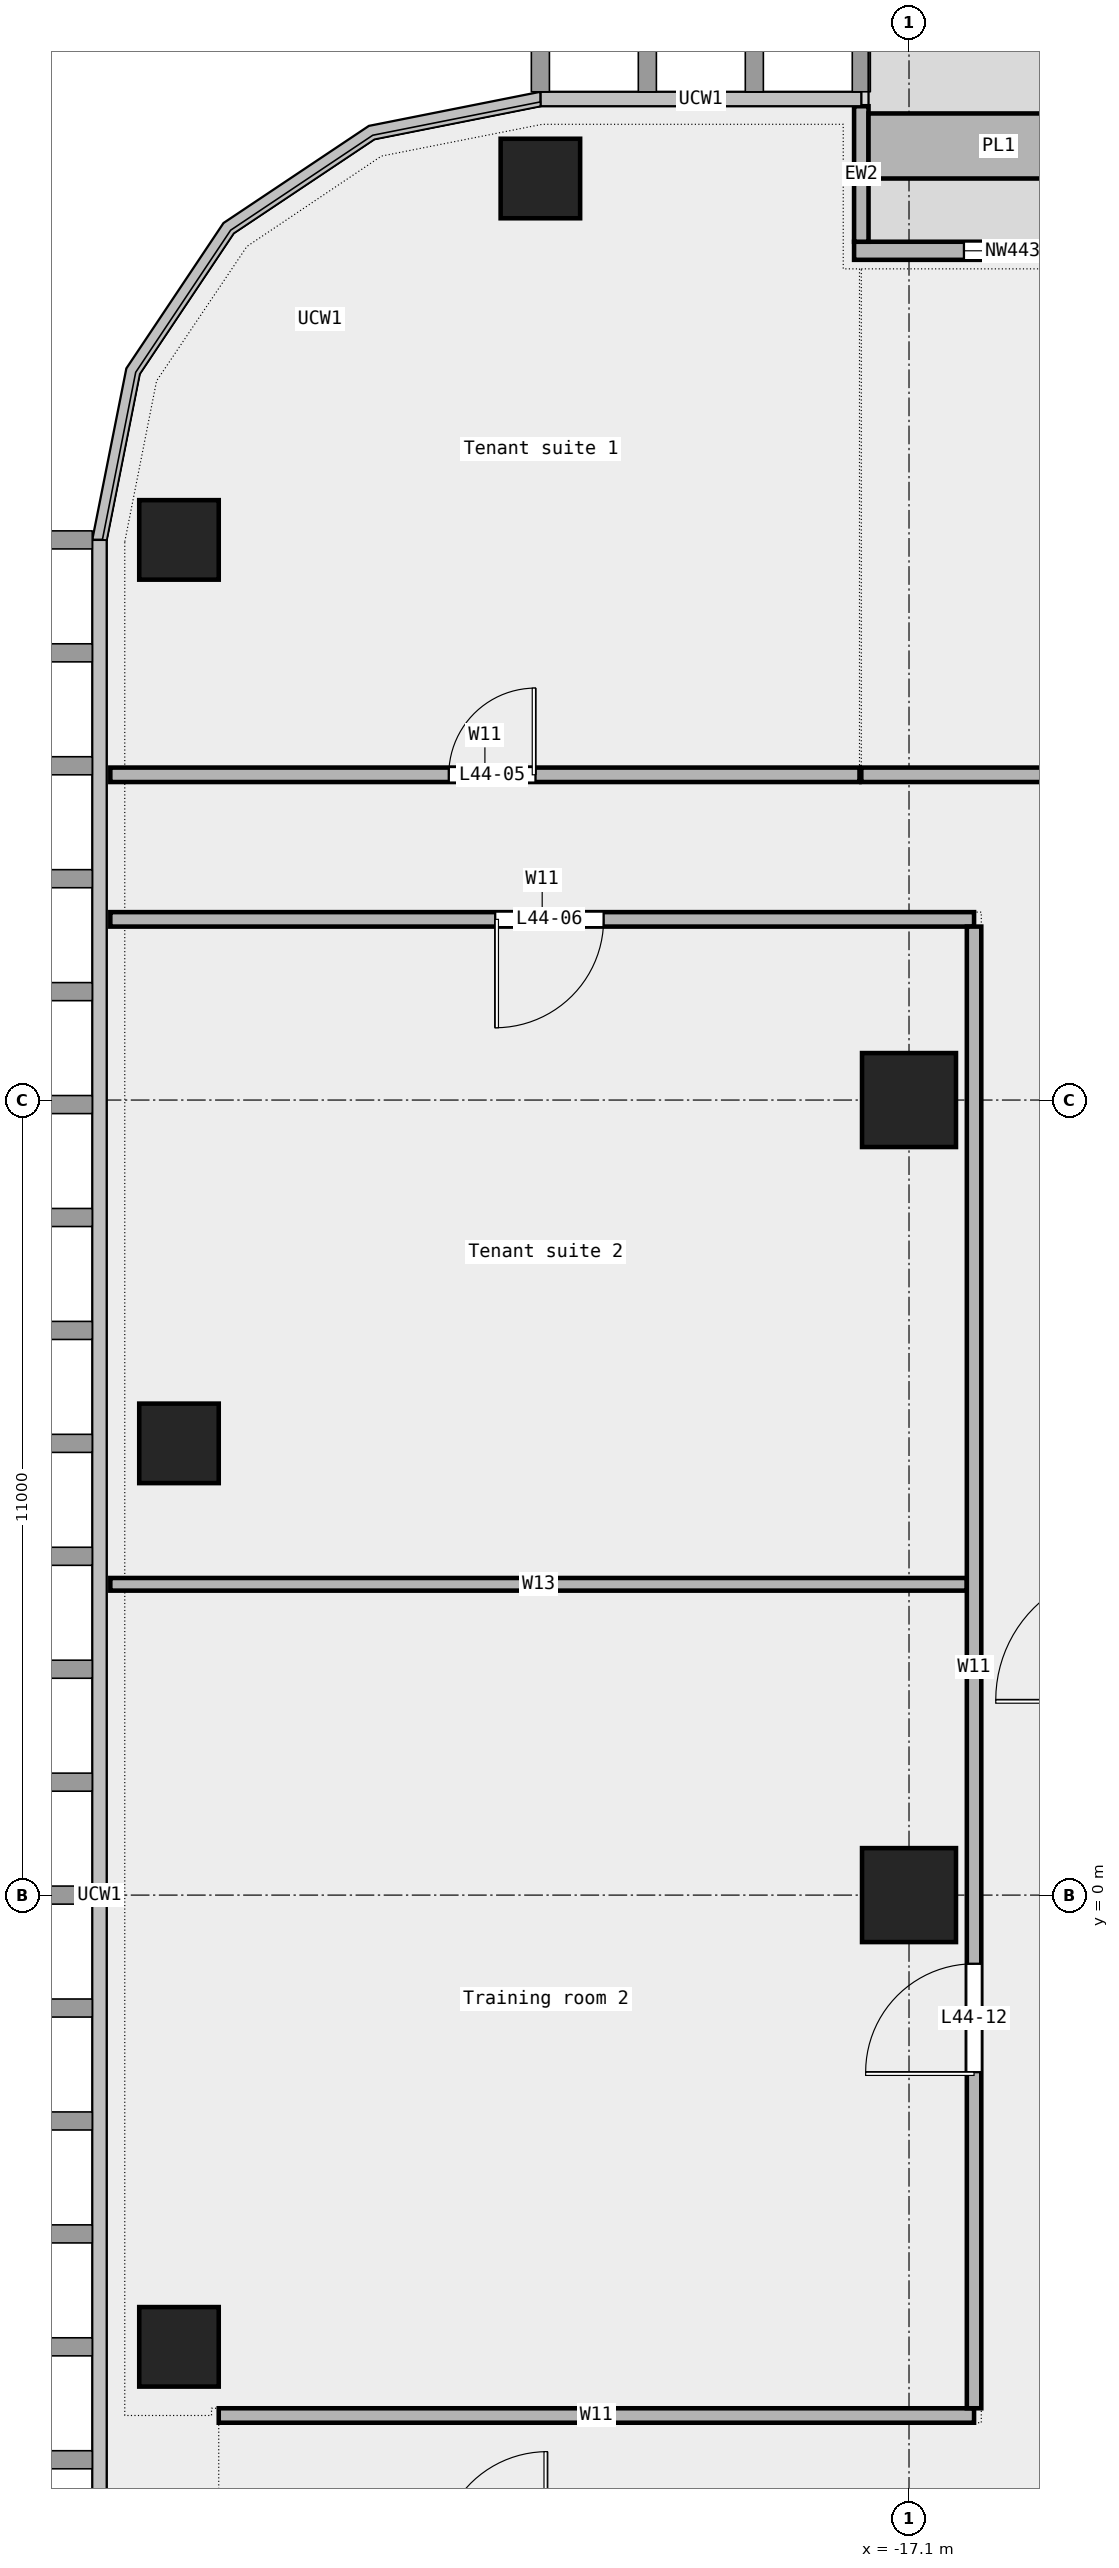
"""IFC4 building model, lengths in metres.
Left out: names, types, materials, properties, quantities, classifications, styles, units other than length and angle.
Written with IfcOpenShell. Run it as: python <this file> out.ifc"""

import sys

from ifc_helpers import new_model, si_unit, direction, frame, frame_2d, origin, origin_2d, place, context, subcontext, project, spatial, rectangle, extrude, element, fill, save


model = new_model("IFC4")
c1 = context("Model", 3, precision=1e-05, world=origin(), true_north=direction((0.0, 1.0)))
c2 = subcontext(c1, "Body", "Model", "MODEL_VIEW")
j1 = project(units=[si_unit("LENGTHUNIT", "METRE"), si_unit("PLANEANGLEUNIT", "RADIAN")], contexts=[c1])
p1 = place(None, origin())
s1 = spatial("IfcSite", under=j1, at=p1, CompositionType="ELEMENT")
p2 = place(p1, origin())
s2 = spatial("IfcBuilding", under=s1, at=p2, CompositionType="ELEMENT")
p3 = place(p2, frame((0.0, 0.0, 211.0)))
s3 = spatial("IfcBuildingStorey", under=s2, at=p3, CompositionType="ELEMENT", Elevation=211.0)
for number, where, z_axis, x_axis in (
    (1, (-22.2, 23.75, 0.0), (0.0, 0.0, 1.0), (1.0, 0.0, 0.0)),
    (2, (-27.2, 18.75, 0.0), (0.0, 0.0, 1.0), (1.0, 0.0, 0.0)),
    (3, (-27.2, 6.25, 0.0), (0.0, 0.0, 1.0), (1.0, 0.0, 0.0)),
    (4, (-27.2, -6.25, 0.0), (0.0, 0.0, 1.0), (1.0, 0.0, 0.0)),
):
    element("IfcColumn", number, at=place(p3, frame(where, z_axis=z_axis, x_axis=x_axis)), inside=s3, PredefinedType="COLUMN", context=c2, shape_type="SweptSolid", body=[
        extrude(rectangle(XDim=1.1, YDim=1.1, at=origin_2d()), origin(), (0.0, 0.0, 1.0), 3.6),
    ])
for number, where, z_axis, x_axis in (
    (5, (-17.1, 0.0, 0.0), (0.0, 0.0, 1.0), (1.0, 0.0, 0.0)),
    (6, (-17.1, 11.0, 0.0), (0.0, 0.0, 1.0), (1.0, 0.0, 0.0)),
):
    element("IfcColumn", number, at=place(p3, frame(where, z_axis=z_axis, x_axis=x_axis)), inside=s3, PredefinedType="COLUMN", context=c2, shape_type="SweptSolid", body=[
        extrude(rectangle(XDim=1.3, YDim=1.3, at=origin_2d()), origin(), (0.0, 0.0, 1.0), 3.6),
    ])
p4 = place(p3, frame((-4.34, 22.75, 0.0), z_axis=(0.0, 0.0, 1.0), x_axis=(-1.0, 0.0, 0.0)))
e7 = element("IfcWall", 7, at=p4, inside=s3, PredefinedType="STANDARD", context=c2, shape_type="SweptSolid", body=[
    extrude(rectangle(XDim=13.52, YDim=0.25, at=frame_2d((6.76, 0.0))), origin(), (0.0, 0.0, 1.0), 3.6),
])
p5 = place(p4, frame((1.5, 0.0, 0.45)))
e8 = element("IfcOpeningElement", 8, at=p5, cuts=e7, PredefinedType="OPENING", context=c2, shape_type="SweptSolid", body=[
    extrude(rectangle(XDim=1.5, YDim=2.4, at=frame_2d((0.75, 1.2))), frame((0.0, 0.137, 0.0), z_axis=(0.0, -1.0, 0.0), x_axis=(1.0, 0.0, 0.0)), (0.0, 0.0, 1.0), 0.274),
])
p6 = place(p4, frame((4.0, 0.0, 0.0)))
e9 = element("IfcOpeningElement", 9, at=p6, cuts=e7, PredefinedType="OPENING", context=c2, shape_type="SweptSolid", body=[
    extrude(rectangle(XDim=1.8, YDim=2.4, at=frame_2d((0.9, 1.2))), frame((0.0, 0.137, 0.0), z_axis=(0.0, -1.0, 0.0), x_axis=(1.0, 0.0, 0.0)), (0.0, 0.0, 1.0), 0.274),
])
p7 = place(p4, frame((10.5, 0.0, 0.45)))
e10 = element("IfcOpeningElement", 10, at=p7, cuts=e7, PredefinedType="OPENING", context=c2, shape_type="SweptSolid", body=[
    extrude(rectangle(XDim=1.5, YDim=2.4, at=frame_2d((0.75, 1.2))), frame((0.0, 0.137, 0.0), z_axis=(0.0, -1.0, 0.0), x_axis=(1.0, 0.0, 0.0)), (0.0, 0.0, 1.0), 0.274),
])
p8 = place(p3, frame((-17.76, 24.75, 0.0), z_axis=(0.0, 0.0, 1.0), x_axis=(0.0, -1.0, 0.0)))
e11 = element("IfcWall", 11, at=p8, inside=s3, PredefinedType="STANDARD", context=c2, shape_type="SweptSolid", body=[
    extrude(rectangle(XDim=1.875, YDim=0.2, at=frame_2d((0.938, 0.0))), origin(), (0.0, 0.0, 1.0), 3.6),
])
p9 = place(p3, frame((-14.06, 24.2, 0.0), z_axis=(0.0, 0.0, 1.0), x_axis=(-1.0, 0.0, 0.0)))
e12 = element("IfcWall", 12, at=p9, inside=s3, PredefinedType="STANDARD", context=c2, shape_type="SweptSolid", body=[
    extrude(rectangle(XDim=3.6, YDim=0.9, at=frame_2d((1.8, 0.0))), origin(), (0.0, 0.0, 1.0), 0.7),
])
p10 = place(p3, frame((-26.65, -7.2, 0.0), z_axis=(0.0, 0.0, 1.0), x_axis=(1.0, 0.0, 0.0)))
e13 = element("IfcWall", 13, at=p10, inside=s3, PredefinedType="PARTITIONING", context=c2, shape_type="SweptSolid", body=[
    extrude(rectangle(XDim=10.45, YDim=0.2, at=frame_2d((5.225, 0.0))), origin(), (0.0, 0.0, 1.0), 3.6),
])
p11 = place(p3, frame((-28.15, 4.3, 0.0), z_axis=(0.0, 0.0, 1.0), x_axis=(1.0, 0.0, 0.0)))
e14 = element("IfcWall", 14, at=p11, inside=s3, PredefinedType="PARTITIONING", context=c2, shape_type="SweptSolid", body=[
    extrude(rectangle(XDim=11.85, YDim=0.175, at=frame_2d((5.925, 0.0))), origin(), (0.0, 0.0, 1.0), 3.6),
])
p12 = place(p3, frame((-28.15, 13.5, 0.0), z_axis=(0.0, 0.0, 1.0), x_axis=(1.0, 0.0, 0.0)))
e15 = element("IfcWall", 15, at=p12, inside=s3, PredefinedType="PARTITIONING", context=c2, shape_type="SweptSolid", body=[
    extrude(rectangle(XDim=11.95, YDim=0.2, at=frame_2d((5.975, 0.0))), origin(), (0.0, 0.0, 1.0), 3.6),
])
p13 = place(p12, frame((5.325, 0.0, 0.0)))
e16 = element("IfcOpeningElement", 16, at=p13, cuts=e15, PredefinedType="OPENING", context=c2, shape_type="SweptSolid", body=[
    extrude(rectangle(XDim=1.5, YDim=2.1, at=frame_2d((0.75, 1.05))), frame((0.0, 0.112, 0.0), z_axis=(0.0, -1.0, 0.0), x_axis=(1.0, 0.0, 0.0)), (0.0, 0.0, 1.0), 0.224),
])
p14 = place(p3, frame((-28.15, 15.5, 0.0), z_axis=(0.0, 0.0, 1.0), x_axis=(1.0, 0.0, 0.0)))
e17 = element("IfcWall", 17, at=p14, inside=s3, PredefinedType="PARTITIONING", context=c2, shape_type="SweptSolid", body=[
    extrude(rectangle(XDim=10.365, YDim=0.2, at=frame_2d((5.183, 0.0))), origin(), (0.0, 0.0, 1.0), 3.6),
])
p15 = place(p14, frame((4.683, 0.0, 0.0)))
e18 = element("IfcOpeningElement", 18, at=p15, cuts=e17, PredefinedType="OPENING", context=c2, shape_type="SweptSolid", body=[
    extrude(rectangle(XDim=1.2, YDim=2.1, at=frame_2d((0.6, 1.05))), frame((0.0, 0.112, 0.0), z_axis=(0.0, -1.0, 0.0), x_axis=(1.0, 0.0, 0.0)), (0.0, 0.0, 1.0), 0.224),
])
p16 = place(p3, frame((-17.76, 15.5, 0.0), z_axis=(0.0, 0.0, 1.0), x_axis=(1.0, 0.0, 0.0)))
e19 = element("IfcWall", 19, at=p16, inside=s3, PredefinedType="PARTITIONING", context=c2, shape_type="SweptSolid", body=[
    extrude(rectangle(XDim=45.91, YDim=0.2, at=frame_2d((22.955, 0.0))), origin(), (0.0, 0.0, 1.0), 3.6),
])
p17 = place(p16, frame((37.337, 0.0, 0.0)))
e20 = element("IfcOpeningElement", 20, at=p17, cuts=e19, PredefinedType="OPENING", context=c2, shape_type="SweptSolid", body=[
    extrude(rectangle(XDim=1.5, YDim=2.1, at=frame_2d((0.75, 1.05))), frame((0.0, 0.112, 0.0), z_axis=(0.0, -1.0, 0.0), x_axis=(1.0, 0.0, 0.0)), (0.0, 0.0, 1.0), 0.224),
])
p18 = place(p16, frame((24.633, 0.0, 0.0)))
e21 = element("IfcOpeningElement", 21, at=p18, cuts=e19, PredefinedType="OPENING", context=c2, shape_type="SweptSolid", body=[
    extrude(rectangle(XDim=1.5, YDim=2.1, at=frame_2d((0.75, 1.05))), frame((0.0, 0.112, 0.0), z_axis=(0.0, -1.0, 0.0), x_axis=(1.0, 0.0, 0.0)), (0.0, 0.0, 1.0), 0.224),
])
p19 = place(p16, frame((5.91, 0.0, 0.0)))
e22 = element("IfcOpeningElement", 22, at=p19, cuts=e19, PredefinedType="OPENING", context=c2, shape_type="SweptSolid", body=[
    extrude(rectangle(XDim=1.5, YDim=2.1, at=frame_2d((0.75, 1.05))), frame((0.0, 0.112, 0.0), z_axis=(0.0, -1.0, 0.0), x_axis=(1.0, 0.0, 0.0)), (0.0, 0.0, 1.0), 0.224),
])
p20 = place(p16, frame((16.21, 0.0, 0.0)))
e23 = element("IfcOpeningElement", 23, at=p20, cuts=e19, PredefinedType="OPENING", context=c2, shape_type="SweptSolid", body=[
    extrude(rectangle(XDim=1.2, YDim=2.1, at=frame_2d((0.6, 1.05))), frame((0.0, 0.112, 0.0), z_axis=(0.0, -1.0, 0.0), x_axis=(1.0, 0.0, 0.0)), (0.0, 0.0, 1.0), 0.224),
])
p21 = place(p3, frame((-16.2, -7.1, 0.0), z_axis=(0.0, 0.0, 1.0), x_axis=(0.0, 1.0, 0.0)))
e24 = element("IfcWall", 24, at=p21, inside=s3, PredefinedType="PARTITIONING", context=c2, shape_type="SweptSolid", body=[
    extrude(rectangle(XDim=20.5, YDim=0.2, at=frame_2d((10.25, 0.0))), origin(), (0.0, 0.0, 1.0), 3.6),
])
p22 = place(p21, frame((4.65, 0.0, 0.0)))
e25 = element("IfcOpeningElement", 25, at=p22, cuts=e24, PredefinedType="OPENING", context=c2, shape_type="SweptSolid", body=[
    extrude(rectangle(XDim=1.5, YDim=2.1, at=frame_2d((0.75, 1.05))), frame((0.0, 0.112, 0.0), z_axis=(0.0, -1.0, 0.0), x_axis=(1.0, 0.0, 0.0)), (0.0, 0.0, 1.0), 0.224),
])
p23 = place(p7, origin())
e26 = element("IfcWindow", 26, at=p23, inside=s3, PartitioningType="SINGLE_PANEL", PredefinedType="WINDOW", context=c2, shape_type="SweptSolid", body=[
    extrude(rectangle(XDim=1.5, YDim=2.4, at=frame_2d((0.75, 1.2))), frame((0.0, 0.03, 0.0), z_axis=(0.0, -1.0, 0.0), x_axis=(1.0, 0.0, 0.0)), (0.0, 0.0, 1.0), 0.06),
])
fill(e10, e26)
p24 = place(p15, origin())
e27 = element("IfcDoor", 27, at=p24, inside=s3, OperationType="SINGLE_SWING_RIGHT", PredefinedType="DOOR", context=c2, shape_type="SweptSolid", body=[
    extrude(rectangle(XDim=1.2, YDim=2.1, at=frame_2d((0.6, 1.05))), frame((0.0, 0.025, 0.0), z_axis=(0.0, -1.0, 0.0), x_axis=(1.0, 0.0, 0.0)), (0.0, 0.0, 1.0), 0.05),
])
fill(e18, e27)
p25 = place(p13, origin())
e28 = element("IfcDoor", 28, at=p25, inside=s3, OperationType="DOUBLE_DOOR_SINGLE_SWING", PredefinedType="DOOR", context=c2, shape_type="SweptSolid", body=[
    extrude(rectangle(XDim=1.5, YDim=2.1, at=frame_2d((0.75, 1.05))), frame((0.0, 0.025, 0.0), z_axis=(0.0, -1.0, 0.0), x_axis=(1.0, 0.0, 0.0)), (0.0, 0.0, 1.0), 0.05),
])
fill(e16, e28)
p26 = place(p22, origin())
e29 = element("IfcDoor", 29, at=p26, inside=s3, OperationType="DOUBLE_DOOR_SINGLE_SWING", PredefinedType="DOOR", context=c2, shape_type="SweptSolid", body=[
    extrude(rectangle(XDim=1.5, YDim=2.1, at=frame_2d((0.75, 1.05))), frame((0.0, 0.025, 0.0), z_axis=(0.0, -1.0, 0.0), x_axis=(1.0, 0.0, 0.0)), (0.0, 0.0, 1.0), 0.05),
])
fill(e25, e29)
save(model, sys.argv[1])
